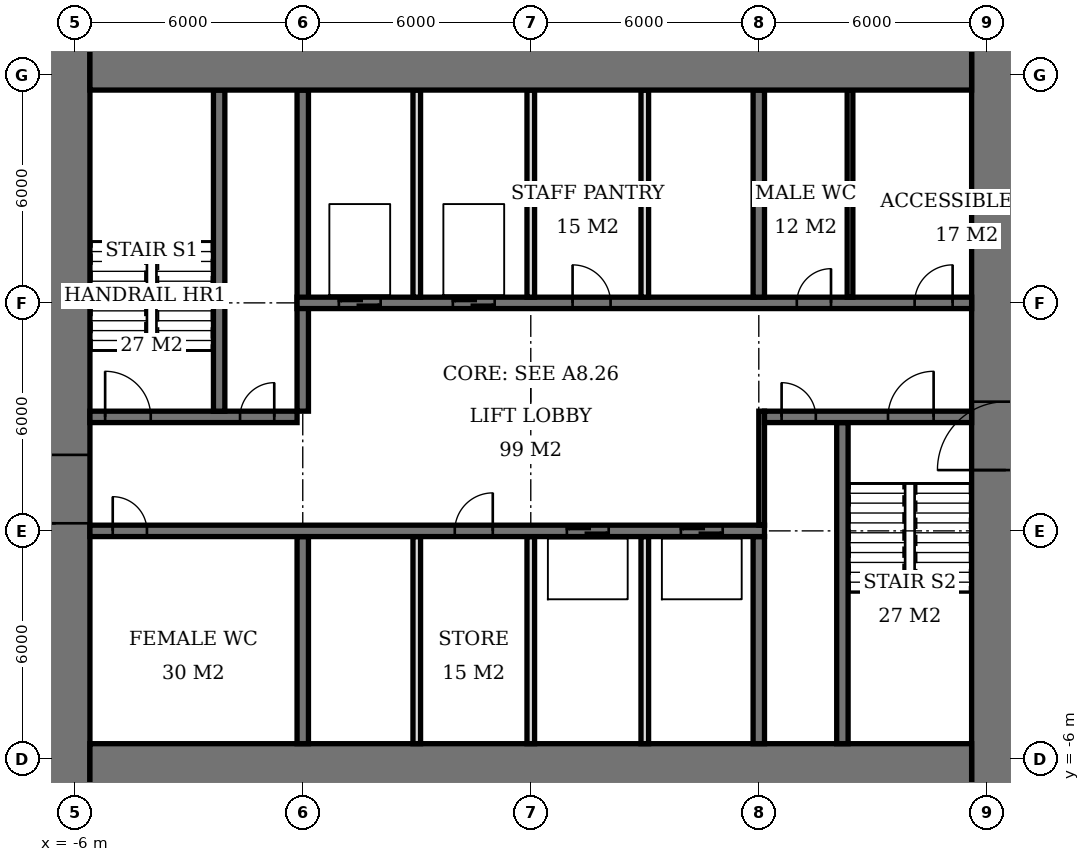
"""IFC4 building model, lengths in metres.
Left out: names, types, materials, properties, quantities, classifications, styles, units other than length and angle.
Written with IfcOpenShell. Run it as: python <this file> out.ifc"""

import sys

from ifc_helpers import new_model, si_unit, direction, frame, frame_2d, origin, place, context, subcontext, project, spatial, rectangle, extrude, element, fill, save


model = new_model("IFC4")
c1 = context("Model", 3, precision=1e-05, world=origin(), true_north=direction((0.0, 1.0)))
c2 = subcontext(c1, "Body", "Model", "MODEL_VIEW")
j1 = project(units=[si_unit("LENGTHUNIT", "METRE"), si_unit("PLANEANGLEUNIT", "RADIAN")], contexts=[c1])
p1 = place(None, origin())
s1 = spatial("IfcSite", under=j1, at=p1, CompositionType="ELEMENT")
p2 = place(p1, origin())
s2 = spatial("IfcBuilding", under=s1, at=p2, CompositionType="ELEMENT")
p3 = place(p2, frame((0.0, 0.0, 192.8)))
s3 = spatial("IfcBuildingStorey", under=s2, at=p3, CompositionType="ELEMENT", Elevation=192.8)
for number, where, z_axis, x_axis in (
    (1, (-5.6, -6.6, 0.0), (0.0, 0.0, 1.0), (1.0, 0.0, 0.0)),
    (2, (-5.6, 12.6, 0.0), (0.0, 0.0, 1.0), (1.0, 0.0, 0.0)),
):
    element("IfcWall", number, at=place(p3, frame(where, z_axis=z_axis, x_axis=x_axis)), inside=s3, PredefinedType="SHEAR", context=c2, shape_type="SweptSolid", body=[
        extrude(rectangle(XDim=23.2, YDim=2.0, at=frame_2d((11.6, 0.0))), origin(), (0.0, 0.0, 1.0), 3.9),
    ])
p4 = place(p3, frame((-6.5, -7.6, 0.0), z_axis=(0.0, 0.0, 1.0), x_axis=(0.0, 1.0, 0.0)))
e3 = element("IfcWall", 3, at=p4, inside=s3, PredefinedType="SHEAR", context=c2, shape_type="SweptSolid", body=[
    extrude(rectangle(XDim=21.2, YDim=1.8, at=frame_2d((10.6, 0.0))), origin(), (0.0, 0.0, 1.0), 3.9),
])
p5 = place(p4, frame((7.8, 0.0, 0.0)))
e4 = element("IfcOpeningElement", 4, at=p5, cuts=e3, PredefinedType="OPENING", context=c2, shape_type="SweptSolid", body=[
    extrude(rectangle(XDim=1.8, YDim=2.4, at=frame_2d((0.9, 1.2))), frame((0.0, 0.91, 0.0), z_axis=(0.0, -1.0, 0.0), x_axis=(1.0, 0.0, 0.0)), (0.0, 0.0, 1.0), 1.82),
])
p6 = place(p3, frame((18.5, -7.6, 0.0), z_axis=(0.0, 0.0, 1.0), x_axis=(0.0, 1.0, 0.0)))
e5 = element("IfcWall", 5, at=p6, inside=s3, PredefinedType="SHEAR", context=c2, shape_type="SweptSolid", body=[
    extrude(rectangle(XDim=21.2, YDim=1.8, at=frame_2d((10.6, 0.0))), origin(), (0.0, 0.0, 1.0), 3.9),
])
p7 = place(p6, frame((9.2, 0.0, 0.0)))
e6 = element("IfcOpeningElement", 6, at=p7, cuts=e5, PredefinedType="OPENING", context=c2, shape_type="SweptSolid", body=[
    extrude(rectangle(XDim=1.8, YDim=2.4, at=frame_2d((0.9, 1.2))), frame((0.0, 0.91, 0.0), z_axis=(0.0, -1.0, 0.0), x_axis=(1.0, 0.0, 0.0)), (0.0, 0.0, 1.0), 1.82),
])
p8 = place(p3, frame((-5.6, 0.0, 0.0), z_axis=(0.0, 0.0, 1.0), x_axis=(1.0, 0.0, 0.0)))
e7 = element("IfcWall", 7, at=p8, inside=s3, PredefinedType="SHEAR", context=c2, shape_type="SweptSolid", body=[
    extrude(rectangle(XDim=17.75, YDim=0.3, at=frame_2d((8.875, 0.0))), origin(), (0.0, 0.0, 1.0), 3.9),
])
p9 = place(p8, frame((0.6, 0.0, 0.0)))
e8 = element("IfcOpeningElement", 8, at=p9, cuts=e7, PredefinedType="OPENING", context=c2, shape_type="SweptSolid", body=[
    extrude(rectangle(XDim=0.9, YDim=2.1, at=frame_2d((0.45, 1.05))), frame((0.0, 0.16, 0.0), z_axis=(0.0, -1.0, 0.0), x_axis=(1.0, 0.0, 0.0)), (0.0, 0.0, 1.0), 0.32),
])
p10 = place(p8, frame((9.6, 0.0, 0.0)))
e9 = element("IfcOpeningElement", 9, at=p10, cuts=e7, PredefinedType="OPENING", context=c2, shape_type="SweptSolid", body=[
    extrude(rectangle(XDim=1.0, YDim=2.1, at=frame_2d((0.5, 1.05))), frame((0.0, 0.16, 0.0), z_axis=(0.0, -1.0, 0.0), x_axis=(1.0, 0.0, 0.0)), (0.0, 0.0, 1.0), 0.32),
])
p11 = place(p8, frame((12.55, 0.0, 0.0)))
e10 = element("IfcOpeningElement", 10, at=p11, cuts=e7, PredefinedType="OPENING", context=c2, shape_type="SweptSolid", body=[
    extrude(rectangle(XDim=1.1, YDim=2.1, at=frame_2d((0.55, 1.05))), frame((0.0, 0.16, 0.0), z_axis=(0.0, -1.0, 0.0), x_axis=(1.0, 0.0, 0.0)), (0.0, 0.0, 1.0), 0.32),
])
p12 = place(p8, frame((15.55, 0.0, 0.0)))
e11 = element("IfcOpeningElement", 11, at=p12, cuts=e7, PredefinedType="OPENING", context=c2, shape_type="SweptSolid", body=[
    extrude(rectangle(XDim=1.1, YDim=2.1, at=frame_2d((0.55, 1.05))), frame((0.0, 0.16, 0.0), z_axis=(0.0, -1.0, 0.0), x_axis=(1.0, 0.0, 0.0)), (0.0, 0.0, 1.0), 0.32),
])
p13 = place(p3, frame((-5.6, 3.0, 0.0), z_axis=(0.0, 0.0, 1.0), x_axis=(1.0, 0.0, 0.0)))
e12 = element("IfcWall", 12, at=p13, inside=s3, PredefinedType="SHEAR", context=c2, shape_type="SweptSolid", body=[
    extrude(rectangle(XDim=5.45, YDim=0.3, at=frame_2d((2.725, 0.0))), origin(), (0.0, 0.0, 1.0), 3.9),
])
p14 = place(p13, frame((0.4, 0.0, 0.0)))
e13 = element("IfcOpeningElement", 13, at=p14, cuts=e12, PredefinedType="OPENING", context=c2, shape_type="SweptSolid", body=[
    extrude(rectangle(XDim=1.2, YDim=2.1, at=frame_2d((0.6, 1.05))), frame((0.0, 0.16, 0.0), z_axis=(0.0, -1.0, 0.0), x_axis=(1.0, 0.0, 0.0)), (0.0, 0.0, 1.0), 0.32),
])
p15 = place(p13, frame((3.95, 0.0, 0.0)))
e14 = element("IfcOpeningElement", 14, at=p15, cuts=e12, PredefinedType="OPENING", context=c2, shape_type="SweptSolid", body=[
    extrude(rectangle(XDim=0.9, YDim=2.1, at=frame_2d((0.45, 1.05))), frame((0.0, 0.16, 0.0), z_axis=(0.0, -1.0, 0.0), x_axis=(1.0, 0.0, 0.0)), (0.0, 0.0, 1.0), 0.32),
])
p16 = place(p3, frame((12.15, 3.0, 0.0), z_axis=(0.0, 0.0, 1.0), x_axis=(1.0, 0.0, 0.0)))
e15 = element("IfcWall", 15, at=p16, inside=s3, PredefinedType="SHEAR", context=c2, shape_type="SweptSolid", body=[
    extrude(rectangle(XDim=5.45, YDim=0.3, at=frame_2d((2.725, 0.0))), origin(), (0.0, 0.0, 1.0), 3.9),
])
p17 = place(p16, frame((3.25, 0.0, 0.0)))
e16 = element("IfcOpeningElement", 16, at=p17, cuts=e15, PredefinedType="OPENING", context=c2, shape_type="SweptSolid", body=[
    extrude(rectangle(XDim=1.2, YDim=2.1, at=frame_2d((0.6, 1.05))), frame((0.0, 0.16, 0.0), z_axis=(0.0, -1.0, 0.0), x_axis=(1.0, 0.0, 0.0)), (0.0, 0.0, 1.0), 0.32),
])
p18 = place(p16, frame((0.45, 0.0, 0.0)))
e17 = element("IfcOpeningElement", 17, at=p18, cuts=e15, PredefinedType="OPENING", context=c2, shape_type="SweptSolid", body=[
    extrude(rectangle(XDim=0.9, YDim=2.1, at=frame_2d((0.45, 1.05))), frame((0.0, 0.16, 0.0), z_axis=(0.0, -1.0, 0.0), x_axis=(1.0, 0.0, 0.0)), (0.0, 0.0, 1.0), 0.32),
])
p19 = place(p3, frame((-0.15, 6.0, 0.0), z_axis=(0.0, 0.0, 1.0), x_axis=(1.0, 0.0, 0.0)))
e18 = element("IfcWall", 18, at=p19, inside=s3, PredefinedType="SHEAR", context=c2, shape_type="SweptSolid", body=[
    extrude(rectangle(XDim=17.75, YDim=0.3, at=frame_2d((8.875, 0.0))), origin(), (0.0, 0.0, 1.0), 3.9),
])
p20 = place(p19, frame((13.15, 0.0, 0.0)))
e19 = element("IfcOpeningElement", 19, at=p20, cuts=e18, PredefinedType="OPENING", context=c2, shape_type="SweptSolid", body=[
    extrude(rectangle(XDim=0.9, YDim=2.1, at=frame_2d((0.45, 1.05))), frame((0.0, 0.16, 0.0), z_axis=(0.0, -1.0, 0.0), x_axis=(1.0, 0.0, 0.0)), (0.0, 0.0, 1.0), 0.32),
])
p21 = place(p19, frame((16.25, 0.0, 0.0)))
e20 = element("IfcOpeningElement", 20, at=p21, cuts=e18, PredefinedType="OPENING", context=c2, shape_type="SweptSolid", body=[
    extrude(rectangle(XDim=1.0, YDim=2.1, at=frame_2d((0.5, 1.05))), frame((0.0, 0.16, 0.0), z_axis=(0.0, -1.0, 0.0), x_axis=(1.0, 0.0, 0.0)), (0.0, 0.0, 1.0), 0.32),
])
p22 = place(p19, frame((7.25, 0.0, 0.0)))
e21 = element("IfcOpeningElement", 21, at=p22, cuts=e18, PredefinedType="OPENING", context=c2, shape_type="SweptSolid", body=[
    extrude(rectangle(XDim=1.0, YDim=2.1, at=frame_2d((0.5, 1.05))), frame((0.0, 0.16, 0.0), z_axis=(0.0, -1.0, 0.0), x_axis=(1.0, 0.0, 0.0)), (0.0, 0.0, 1.0), 0.32),
])
p23 = place(p19, frame((1.1, 0.0, 0.0)))
e22 = element("IfcOpeningElement", 22, at=p23, cuts=e18, PredefinedType="OPENING", context=c2, shape_type="SweptSolid", body=[
    extrude(rectangle(XDim=1.1, YDim=2.1, at=frame_2d((0.55, 1.05))), frame((0.0, 0.16, 0.0), z_axis=(0.0, -1.0, 0.0), x_axis=(1.0, 0.0, 0.0)), (0.0, 0.0, 1.0), 0.32),
])
p24 = place(p19, frame((4.1, 0.0, 0.0)))
e23 = element("IfcOpeningElement", 23, at=p24, cuts=e18, PredefinedType="OPENING", context=c2, shape_type="SweptSolid", body=[
    extrude(rectangle(XDim=1.1, YDim=2.1, at=frame_2d((0.55, 1.05))), frame((0.0, 0.16, 0.0), z_axis=(0.0, -1.0, 0.0), x_axis=(1.0, 0.0, 0.0)), (0.0, 0.0, 1.0), 0.32),
])
p25 = place(p3, frame((0.0, -5.6, 0.0), z_axis=(0.0, 0.0, 1.0), x_axis=(0.0, 1.0, 0.0)))
e24 = element("IfcWall", 24, at=p25, inside=s3, PredefinedType="SHEAR", context=c2, shape_type="SweptSolid", body=[
    extrude(rectangle(XDim=5.45, YDim=0.3, at=frame_2d((2.725, 0.0))), origin(), (0.0, 0.0, 1.0), 3.9),
])
p26 = place(p3, frame((0.0, 3.15, 0.0), z_axis=(0.0, 0.0, 1.0), x_axis=(0.0, 1.0, 0.0)))
e25 = element("IfcWall", 25, at=p26, inside=s3, PredefinedType="SHEAR", context=c2, shape_type="SweptSolid", body=[
    extrude(rectangle(XDim=8.45, YDim=0.3, at=frame_2d((4.225, 0.0))), origin(), (0.0, 0.0, 1.0), 3.9),
])
for number, where, z_axis, x_axis in (
    (26, (12.0, -5.6, 0.0), (0.0, 0.0, 1.0), (0.0, 1.0, 0.0)),
    (27, (12.0, 6.15, 0.0), (0.0, 0.0, 1.0), (0.0, 1.0, 0.0)),
):
    element("IfcWall", number, at=place(p3, frame(where, z_axis=z_axis, x_axis=x_axis)), inside=s3, PredefinedType="SHEAR", context=c2, shape_type="SweptSolid", body=[
        extrude(rectangle(XDim=5.45, YDim=0.3, at=frame_2d((2.725, 0.0))), origin(), (0.0, 0.0, 1.0), 3.9),
    ])
for number, where, z_axis, x_axis in (
    (28, (-2.2, 3.15, 0.0), (0.0, 0.0, 1.0), (0.0, 1.0, 0.0)),
    (29, (14.2, -5.6, 0.0), (0.0, 0.0, 1.0), (0.0, 1.0, 0.0)),
):
    element("IfcWall", number, at=place(p3, frame(where, z_axis=z_axis, x_axis=x_axis)), inside=s3, PredefinedType="SHEAR", context=c2, shape_type="SweptSolid", body=[
        extrude(rectangle(XDim=8.45, YDim=0.3, at=frame_2d((4.225, 0.0))), origin(), (0.0, 0.0, 1.0), 3.9),
    ])
for number, where, z_axis, x_axis in (
    (30, (3.0, 6.15, 0.0), (0.0, 0.0, 1.0), (0.0, 1.0, 0.0)),
    (31, (6.0, 6.15, 0.0), (0.0, 0.0, 1.0), (0.0, 1.0, 0.0)),
    (32, (9.0, 6.15, 0.0), (0.0, 0.0, 1.0), (0.0, 1.0, 0.0)),
    (33, (3.0, -5.6, 0.0), (0.0, 0.0, 1.0), (0.0, 1.0, 0.0)),
    (34, (6.0, -5.6, 0.0), (0.0, 0.0, 1.0), (0.0, 1.0, 0.0)),
    (35, (9.0, -5.6, 0.0), (0.0, 0.0, 1.0), (0.0, 1.0, 0.0)),
):
    element("IfcWall", number, at=place(p3, frame(where, z_axis=z_axis, x_axis=x_axis)), inside=s3, PredefinedType="SOLIDWALL", context=c2, shape_type="SweptSolid", body=[
        extrude(rectangle(XDim=5.45, YDim=0.2, at=frame_2d((2.725, 0.0))), origin(), (0.0, 0.0, 1.0), 3.9),
    ])
p27 = place(p3, frame((14.4, 6.15, 0.0), z_axis=(0.0, 0.0, 1.0), x_axis=(0.0, 1.0, 0.0)))
e36 = element("IfcWall", 36, at=p27, inside=s3, PredefinedType="PLUMBINGWALL", context=c2, shape_type="SweptSolid", body=[
    extrude(rectangle(XDim=5.45, YDim=0.15, at=frame_2d((2.725, 0.0))), origin(), (0.0, 0.0, 1.0), 3.65),
])
p28 = place(p3, frame((12.075, 0.15, 0.0), z_axis=(0.0, 0.0, 1.0), x_axis=(0.0, 1.0, 0.0)))
e37 = element("IfcWall", 37, at=p28, inside=s3, PredefinedType="PARTITIONING", context=c2, shape_type="SweptSolid", body=[
    extrude(rectangle(XDim=3.0, YDim=0.15, at=frame_2d((1.5, 0.0))), origin(), (0.0, 0.0, 1.0), 3.65),
])
p29 = place(p5, origin())
e38 = element("IfcDoor", 38, at=p29, inside=s3, OperationType="DOUBLE_DOOR_SINGLE_SWING", PredefinedType="DOOR", context=c2, shape_type="SweptSolid", body=[
    extrude(rectangle(XDim=1.8, YDim=2.4, at=frame_2d((0.9, 1.2))), frame((0.0, 0.025, 0.0), z_axis=(0.0, -1.0, 0.0), x_axis=(1.0, 0.0, 0.0)), (0.0, 0.0, 1.0), 0.05),
])
fill(e4, e38)
p30 = place(p7, origin())
e39 = element("IfcDoor", 39, at=p30, inside=s3, OperationType="DOUBLE_DOOR_SINGLE_SWING", PredefinedType="DOOR", context=c2, shape_type="SweptSolid", body=[
    extrude(rectangle(XDim=1.8, YDim=2.4, at=frame_2d((0.9, 1.2))), frame((0.0, 0.025, 0.0), z_axis=(0.0, -1.0, 0.0), x_axis=(1.0, 0.0, 0.0)), (0.0, 0.0, 1.0), 0.05),
])
fill(e6, e39)
p31 = place(p14, origin())
e40 = element("IfcDoor", 40, at=p31, inside=s3, OperationType="SINGLE_SWING_LEFT", PredefinedType="DOOR", context=c2, shape_type="SweptSolid", body=[
    extrude(rectangle(XDim=1.2, YDim=2.1, at=frame_2d((0.6, 1.05))), frame((0.0, 0.025, 0.0), z_axis=(0.0, -1.0, 0.0), x_axis=(1.0, 0.0, 0.0)), (0.0, 0.0, 1.0), 0.05),
])
fill(e13, e40)
p32 = place(p15, origin())
e41 = element("IfcDoor", 41, at=p32, inside=s3, OperationType="SINGLE_SWING_RIGHT", PredefinedType="DOOR", context=c2, shape_type="SweptSolid", body=[
    extrude(rectangle(XDim=0.9, YDim=2.1, at=frame_2d((0.45, 1.05))), frame((0.0, 0.025, 0.0), z_axis=(0.0, -1.0, 0.0), x_axis=(1.0, 0.0, 0.0)), (0.0, 0.0, 1.0), 0.05),
])
fill(e14, e41)
p33 = place(p17, origin())
e42 = element("IfcDoor", 42, at=p33, inside=s3, OperationType="SINGLE_SWING_RIGHT", PredefinedType="DOOR", context=c2, shape_type="SweptSolid", body=[
    extrude(rectangle(XDim=1.2, YDim=2.1, at=frame_2d((0.6, 1.05))), frame((0.0, 0.025, 0.0), z_axis=(0.0, -1.0, 0.0), x_axis=(1.0, 0.0, 0.0)), (0.0, 0.0, 1.0), 0.05),
])
fill(e16, e42)
p34 = place(p18, origin())
e43 = element("IfcDoor", 43, at=p34, inside=s3, OperationType="SINGLE_SWING_LEFT", PredefinedType="DOOR", context=c2, shape_type="SweptSolid", body=[
    extrude(rectangle(XDim=0.9, YDim=2.1, at=frame_2d((0.45, 1.05))), frame((0.0, 0.025, 0.0), z_axis=(0.0, -1.0, 0.0), x_axis=(1.0, 0.0, 0.0)), (0.0, 0.0, 1.0), 0.05),
])
fill(e17, e43)
p35 = place(p9, origin())
e44 = element("IfcDoor", 44, at=p35, inside=s3, OperationType="SINGLE_SWING_LEFT", PredefinedType="DOOR", context=c2, shape_type="SweptSolid", body=[
    extrude(rectangle(XDim=0.9, YDim=2.1, at=frame_2d((0.45, 1.05))), frame((0.0, 0.025, 0.0), z_axis=(0.0, -1.0, 0.0), x_axis=(1.0, 0.0, 0.0)), (0.0, 0.0, 1.0), 0.05),
])
fill(e8, e44)
p36 = place(p20, origin())
e45 = element("IfcDoor", 45, at=p36, inside=s3, OperationType="SINGLE_SWING_RIGHT", PredefinedType="DOOR", context=c2, shape_type="SweptSolid", body=[
    extrude(rectangle(XDim=0.9, YDim=2.1, at=frame_2d((0.45, 1.05))), frame((0.0, 0.025, 0.0), z_axis=(0.0, -1.0, 0.0), x_axis=(1.0, 0.0, 0.0)), (0.0, 0.0, 1.0), 0.05),
])
fill(e19, e45)
p37 = place(p21, origin())
e46 = element("IfcDoor", 46, at=p37, inside=s3, OperationType="SINGLE_SWING_RIGHT", PredefinedType="DOOR", context=c2, shape_type="SweptSolid", body=[
    extrude(rectangle(XDim=1.0, YDim=2.1, at=frame_2d((0.5, 1.05))), frame((0.0, 0.025, 0.0), z_axis=(0.0, -1.0, 0.0), x_axis=(1.0, 0.0, 0.0)), (0.0, 0.0, 1.0), 0.05),
])
fill(e20, e46)
p38 = place(p22, origin())
e47 = element("IfcDoor", 47, at=p38, inside=s3, OperationType="SINGLE_SWING_LEFT", PredefinedType="DOOR", context=c2, shape_type="SweptSolid", body=[
    extrude(rectangle(XDim=1.0, YDim=2.1, at=frame_2d((0.5, 1.05))), frame((0.0, 0.025, 0.0), z_axis=(0.0, -1.0, 0.0), x_axis=(1.0, 0.0, 0.0)), (0.0, 0.0, 1.0), 0.05),
])
fill(e21, e47)
p39 = place(p10, origin())
e48 = element("IfcDoor", 48, at=p39, inside=s3, OperationType="SINGLE_SWING_RIGHT", PredefinedType="DOOR", context=c2, shape_type="SweptSolid", body=[
    extrude(rectangle(XDim=1.0, YDim=2.1, at=frame_2d((0.5, 1.05))), frame((0.0, 0.025, 0.0), z_axis=(0.0, -1.0, 0.0), x_axis=(1.0, 0.0, 0.0)), (0.0, 0.0, 1.0), 0.05),
])
fill(e9, e48)
p40 = place(p23, origin())
e49 = element("IfcDoor", 49, at=p40, inside=s3, OperationType="DOUBLE_DOOR_SLIDING", PredefinedType="USERDEFINED", context=c2, shape_type="SweptSolid", body=[
    extrude(rectangle(XDim=1.1, YDim=2.1, at=frame_2d((0.55, 1.05))), frame((0.0, 0.025, 0.0), z_axis=(0.0, -1.0, 0.0), x_axis=(1.0, 0.0, 0.0)), (0.0, 0.0, 1.0), 0.05),
])
fill(e22, e49)
p41 = place(p24, origin())
e50 = element("IfcDoor", 50, at=p41, inside=s3, OperationType="DOUBLE_DOOR_SLIDING", PredefinedType="USERDEFINED", context=c2, shape_type="SweptSolid", body=[
    extrude(rectangle(XDim=1.1, YDim=2.1, at=frame_2d((0.55, 1.05))), frame((0.0, 0.025, 0.0), z_axis=(0.0, -1.0, 0.0), x_axis=(1.0, 0.0, 0.0)), (0.0, 0.0, 1.0), 0.05),
])
fill(e23, e50)
p42 = place(p11, origin())
e51 = element("IfcDoor", 51, at=p42, inside=s3, OperationType="DOUBLE_DOOR_SLIDING", PredefinedType="USERDEFINED", context=c2, shape_type="SweptSolid", body=[
    extrude(rectangle(XDim=1.1, YDim=2.1, at=frame_2d((0.55, 1.05))), frame((0.0, 0.025, 0.0), z_axis=(0.0, -1.0, 0.0), x_axis=(1.0, 0.0, 0.0)), (0.0, 0.0, 1.0), 0.05),
])
fill(e10, e51)
p43 = place(p12, origin())
e52 = element("IfcDoor", 52, at=p43, inside=s3, OperationType="DOUBLE_DOOR_SLIDING", PredefinedType="USERDEFINED", context=c2, shape_type="SweptSolid", body=[
    extrude(rectangle(XDim=1.1, YDim=2.1, at=frame_2d((0.55, 1.05))), frame((0.0, 0.025, 0.0), z_axis=(0.0, -1.0, 0.0), x_axis=(1.0, 0.0, 0.0)), (0.0, 0.0, 1.0), 0.05),
])
fill(e11, e52)
save(model, sys.argv[1])
